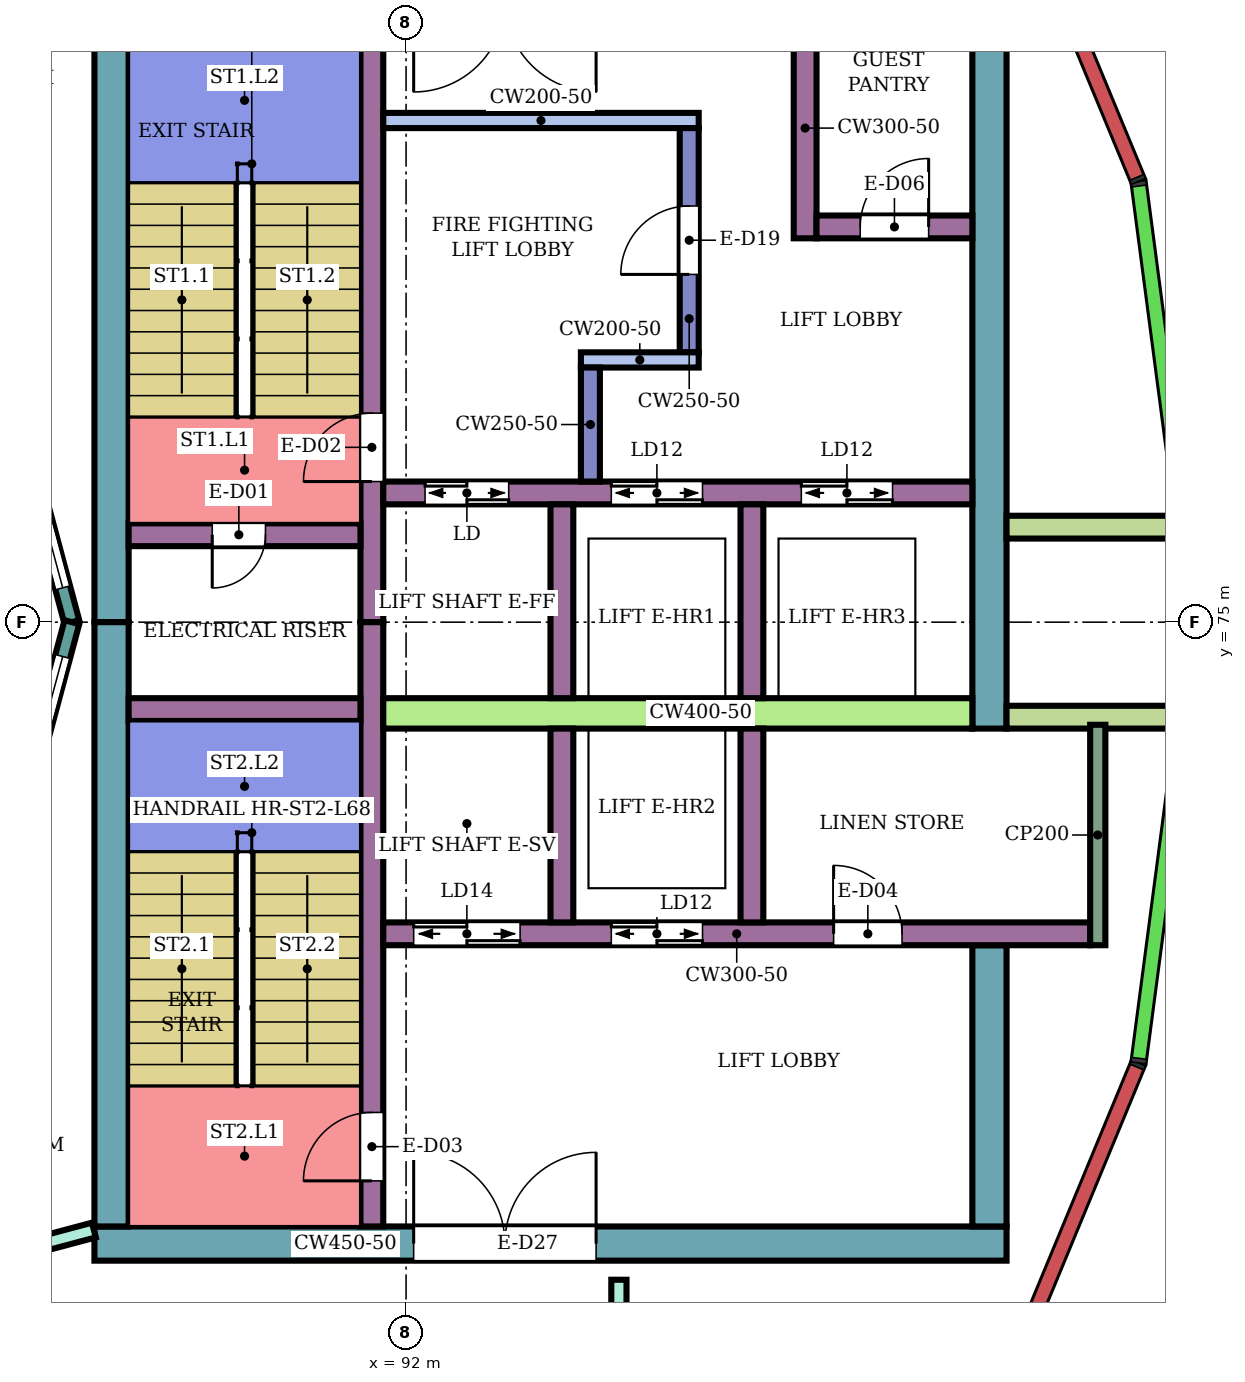
"""IFC4 building model, lengths in metres.
Left out: names, types, materials, properties, quantities, classifications, styles, units other than length and angle.
Written with IfcOpenShell. Run it as: python <this file> out.ifc"""

import sys

from ifc_helpers import new_model, si_unit, direction, frame, frame_2d, origin, place, context, subcontext, project, spatial, rectangle, extrude, element, fill, save


model = new_model("IFC4")
c1 = context("Model", 3, precision=1e-05, world=origin(), true_north=direction((0.0, 1.0)))
c2 = subcontext(c1, "Body", "Model", "MODEL_VIEW")
j1 = project(units=[si_unit("LENGTHUNIT", "METRE"), si_unit("PLANEANGLEUNIT", "RADIAN")], contexts=[c1])
p1 = place(None, origin())
s1 = spatial("IfcSite", under=j1, at=p1, CompositionType="ELEMENT")
p2 = place(p1, origin())
s2 = spatial("IfcBuilding", under=s1, at=p2, CompositionType="ELEMENT")
p3 = place(p2, frame((0.0, 0.0, 296.7)))
s3 = spatial("IfcBuildingStorey", under=s2, at=p3, CompositionType="ELEMENT", Elevation=296.7)
p4 = place(p3, frame((87.9, 66.825, 0.0), z_axis=(0.0, 0.0, 1.0), x_axis=(1.0, 0.0, 0.0)))
e1 = element("IfcWall", 1, at=p4, inside=s3, PredefinedType="SHEAR", context=c2, shape_type="SweptSolid", body=[
    extrude(rectangle(XDim=12.0, YDim=0.45, at=frame_2d((6.0, 0.0))), origin(), (0.0, 0.0, 1.0), 3.88),
])
p5 = place(p4, frame((4.2, 0.0, 0.0)))
e2 = element("IfcOpeningElement", 2, at=p5, cuts=e1, PredefinedType="OPENING", context=c2, shape_type="SweptSolid", body=[
    extrude(rectangle(XDim=2.4, YDim=2.4, at=frame_2d((1.2, 1.2))), frame((0.0, 0.235, 0.0), z_axis=(0.0, -1.0, 0.0), x_axis=(1.0, 0.0, 0.0)), (0.0, 0.0, 1.0), 0.47),
])
for number, where, z_axis, x_axis in (
    (3, (88.125, 75.0, 0.0), (0.0, 0.0, 1.0), (0.0, 1.0, 0.0)),
    (4, (88.125, 67.05, 0.0), (0.0, 0.0, 1.0), (0.0, 1.0, 0.0)),
):
    element("IfcWall", number, at=place(p3, frame(where, z_axis=z_axis, x_axis=x_axis)), inside=s3, PredefinedType="SHEAR", context=c2, shape_type="SweptSolid", body=[
        extrude(rectangle(XDim=7.95, YDim=0.45, at=frame_2d((3.975, 0.0))), origin(), (0.0, 0.0, 1.0), 3.88),
    ])
p6 = place(p3, frame((99.675, 73.6, 0.0), z_axis=(0.0, 0.0, 1.0), x_axis=(0.0, 1.0, 0.0)))
e5 = element("IfcWall", 5, at=p6, inside=s3, PredefinedType="SHEAR", context=c2, shape_type="SweptSolid", body=[
    extrude(rectangle(XDim=9.35, YDim=0.45, at=frame_2d((4.675, 0.0))), origin(), (0.0, 0.0, 1.0), 3.88),
])
p7 = place(p3, frame((99.675, 67.05, 0.0), z_axis=(0.0, 0.0, 1.0), x_axis=(0.0, 1.0, 0.0)))
e6 = element("IfcWall", 6, at=p7, inside=s3, PredefinedType="SHEAR", context=c2, shape_type="SweptSolid", body=[
    extrude(rectangle(XDim=3.7, YDim=0.45, at=frame_2d((1.85, 0.0))), origin(), (0.0, 0.0, 1.0), 3.88),
])
p8 = place(p3, frame((91.55, 75.0, 0.0), z_axis=(0.0, 0.0, 1.0), x_axis=(0.0, 1.0, 0.0)))
e7 = element("IfcWall", 7, at=p8, inside=s3, PredefinedType="SHEAR", context=c2, shape_type="SweptSolid", body=[
    extrude(rectangle(XDim=7.95, YDim=0.3, at=frame_2d((3.975, 0.0))), origin(), (0.0, 0.0, 1.0), 3.88),
])
p9 = place(p8, frame((1.85, 0.0, 0.0)))
e8 = element("IfcOpeningElement", 8, at=p9, cuts=e7, PredefinedType="OPENING", context=c2, shape_type="SweptSolid", body=[
    extrude(rectangle(XDim=0.9, YDim=2.1, at=frame_2d((0.45, 1.05))), frame((0.0, 0.16, 0.0), z_axis=(0.0, -1.0, 0.0), x_axis=(1.0, 0.0, 0.0)), (0.0, 0.0, 1.0), 0.32),
])
p10 = place(p3, frame((91.55, 67.05, 0.0), z_axis=(0.0, 0.0, 1.0), x_axis=(0.0, 1.0, 0.0)))
e9 = element("IfcWall", 9, at=p10, inside=s3, PredefinedType="SHEAR", context=c2, shape_type="SweptSolid", body=[
    extrude(rectangle(XDim=7.95, YDim=0.3, at=frame_2d((3.975, 0.0))), origin(), (0.0, 0.0, 1.0), 3.88),
])
p11 = place(p10, frame((0.6, 0.0, 0.0)))
e10 = element("IfcOpeningElement", 10, at=p11, cuts=e9, PredefinedType="OPENING", context=c2, shape_type="SweptSolid", body=[
    extrude(rectangle(XDim=0.9, YDim=2.1, at=frame_2d((0.45, 1.05))), frame((0.0, 0.16, 0.0), z_axis=(0.0, -1.0, 0.0), x_axis=(1.0, 0.0, 0.0)), (0.0, 0.0, 1.0), 0.32),
])
p12 = place(p3, frame((88.35, 76.15, 0.0), z_axis=(0.0, 0.0, 1.0), x_axis=(1.0, 0.0, 0.0)))
e11 = element("IfcWall", 11, at=p12, inside=s3, PredefinedType="SHEAR", context=c2, shape_type="SweptSolid", body=[
    extrude(rectangle(XDim=3.05, YDim=0.3, at=frame_2d((1.525, 0.0))), origin(), (0.0, 0.0, 1.0), 3.88),
])
p13 = place(p12, frame((1.1, 0.0, 0.0)))
e12 = element("IfcOpeningElement", 12, at=p13, cuts=e11, PredefinedType="OPENING", context=c2, shape_type="SweptSolid", body=[
    extrude(rectangle(XDim=0.7, YDim=2.0, at=frame_2d((0.35, 1.0))), frame((0.0, 0.16, 0.0), z_axis=(0.0, -1.0, 0.0), x_axis=(1.0, 0.0, 0.0)), (0.0, 0.0, 1.0), 0.32),
])
p14 = place(p3, frame((88.35, 73.85, 0.0), z_axis=(0.0, 0.0, 1.0), x_axis=(1.0, 0.0, 0.0)))
e13 = element("IfcWall", 13, at=p14, inside=s3, PredefinedType="SHEAR", context=c2, shape_type="SweptSolid", body=[
    extrude(rectangle(XDim=3.05, YDim=0.3, at=frame_2d((1.525, 0.0))), origin(), (0.0, 0.0, 1.0), 3.88),
])
p15 = place(p3, frame((91.7, 76.7, 0.0), z_axis=(0.0, 0.0, 1.0), x_axis=(1.0, 0.0, 0.0)))
e14 = element("IfcWall", 14, at=p15, inside=s3, PredefinedType="SHEAR", context=c2, shape_type="SweptSolid", body=[
    extrude(rectangle(XDim=7.75, YDim=0.3, at=frame_2d((3.875, 0.0))), origin(), (0.0, 0.0, 1.0), 3.88),
])
p16 = place(p15, frame((0.55, 0.0, 0.0)))
e15 = element("IfcOpeningElement", 15, at=p16, cuts=e14, PredefinedType="OPENING", context=c2, shape_type="SweptSolid", body=[
    extrude(rectangle(XDim=1.1, YDim=2.1, at=frame_2d((0.55, 1.05))), frame((0.0, 0.16, 0.0), z_axis=(0.0, -1.0, 0.0), x_axis=(1.0, 0.0, 0.0)), (0.0, 0.0, 1.0), 0.32),
])
p17 = place(p15, frame((3.0, 0.0, 0.0)))
e16 = element("IfcOpeningElement", 16, at=p17, cuts=e14, PredefinedType="OPENING", context=c2, shape_type="SweptSolid", body=[
    extrude(rectangle(XDim=1.2, YDim=2.1, at=frame_2d((0.6, 1.05))), frame((0.0, 0.16, 0.0), z_axis=(0.0, -1.0, 0.0), x_axis=(1.0, 0.0, 0.0)), (0.0, 0.0, 1.0), 0.32),
])
p18 = place(p15, frame((5.5, 0.0, 0.0)))
e17 = element("IfcOpeningElement", 17, at=p18, cuts=e14, PredefinedType="OPENING", context=c2, shape_type="SweptSolid", body=[
    extrude(rectangle(XDim=1.2, YDim=2.1, at=frame_2d((0.6, 1.05))), frame((0.0, 0.16, 0.0), z_axis=(0.0, -1.0, 0.0), x_axis=(1.0, 0.0, 0.0)), (0.0, 0.0, 1.0), 0.32),
])
p19 = place(p3, frame((91.7, 73.8, 0.0), z_axis=(0.0, 0.0, 1.0), x_axis=(1.0, 0.0, 0.0)))
e18 = element("IfcWall", 18, at=p19, inside=s3, PredefinedType="SHEAR", context=c2, shape_type="SweptSolid", body=[
    extrude(rectangle(XDim=7.75, YDim=0.4, at=frame_2d((3.875, 0.0))), origin(), (0.0, 0.0, 1.0), 3.88),
])
p20 = place(p3, frame((91.7, 70.9, 0.0), z_axis=(0.0, 0.0, 1.0), x_axis=(1.0, 0.0, 0.0)))
e19 = element("IfcWall", 19, at=p20, inside=s3, PredefinedType="SHEAR", context=c2, shape_type="SweptSolid", body=[
    extrude(rectangle(XDim=9.3, YDim=0.3, at=frame_2d((4.65, 0.0))), origin(), (0.0, 0.0, 1.0), 3.88),
])
p21 = place(p20, frame((0.4, 0.0, 0.0)))
e20 = element("IfcOpeningElement", 20, at=p21, cuts=e19, PredefinedType="OPENING", context=c2, shape_type="SweptSolid", body=[
    extrude(rectangle(XDim=1.4, YDim=2.1, at=frame_2d((0.7, 1.05))), frame((0.0, 0.16, 0.0), z_axis=(0.0, -1.0, 0.0), x_axis=(1.0, 0.0, 0.0)), (0.0, 0.0, 1.0), 0.32),
])
p22 = place(p20, frame((3.0, 0.0, 0.0)))
e21 = element("IfcOpeningElement", 21, at=p22, cuts=e19, PredefinedType="OPENING", context=c2, shape_type="SweptSolid", body=[
    extrude(rectangle(XDim=1.2, YDim=2.1, at=frame_2d((0.6, 1.05))), frame((0.0, 0.16, 0.0), z_axis=(0.0, -1.0, 0.0), x_axis=(1.0, 0.0, 0.0)), (0.0, 0.0, 1.0), 0.32),
])
p23 = place(p20, frame((5.925, 0.0, 0.0)))
e22 = element("IfcOpeningElement", 22, at=p23, cuts=e19, PredefinedType="OPENING", context=c2, shape_type="SweptSolid", body=[
    extrude(rectangle(XDim=0.9, YDim=2.1, at=frame_2d((0.45, 1.05))), frame((0.0, 0.16, 0.0), z_axis=(0.0, -1.0, 0.0), x_axis=(1.0, 0.0, 0.0)), (0.0, 0.0, 1.0), 0.32),
])
for number, where, z_axis, x_axis in (
    (23, (94.05, 74.0, 0.0), (0.0, 0.0, 1.0), (0.0, 1.0, 0.0)),
    (24, (96.55, 74.0, 0.0), (0.0, 0.0, 1.0), (0.0, 1.0, 0.0)),
    (25, (94.05, 71.05, 0.0), (0.0, 0.0, 1.0), (0.0, 1.0, 0.0)),
    (26, (96.55, 71.05, 0.0), (0.0, 0.0, 1.0), (0.0, 1.0, 0.0)),
):
    element("IfcWall", number, at=place(p3, frame(where, z_axis=z_axis, x_axis=x_axis)), inside=s3, PredefinedType="SHEAR", context=c2, shape_type="SweptSolid", body=[
        extrude(rectangle(XDim=2.55, YDim=0.3, at=frame_2d((1.275, 0.0))), origin(), (0.0, 0.0, 1.0), 3.88),
    ])
p24 = place(p3, frame((91.7, 81.6, 0.0), z_axis=(0.0, 0.0, 1.0), x_axis=(1.0, 0.0, 0.0)))
e27 = element("IfcWall", 27, at=p24, inside=s3, PredefinedType="SHEAR", context=c2, shape_type="SweptSolid", body=[
    extrude(rectangle(XDim=4.15, YDim=0.2, at=frame_2d((2.075, 0.0))), origin(), (0.0, 0.0, 1.0), 3.88),
])
p25 = place(p3, frame((95.725, 78.55, 0.0), z_axis=(0.0, 0.0, 1.0), x_axis=(0.0, 1.0, 0.0)))
e28 = element("IfcWall", 28, at=p25, inside=s3, PredefinedType="SHEAR", context=c2, shape_type="SweptSolid", body=[
    extrude(rectangle(XDim=2.95, YDim=0.25, at=frame_2d((1.475, 0.0))), origin(), (0.0, 0.0, 1.0), 3.88),
])
p26 = place(p25, frame((1.025, 0.0, 0.0)))
e29 = element("IfcOpeningElement", 29, at=p26, cuts=e28, PredefinedType="OPENING", context=c2, shape_type="SweptSolid", body=[
    extrude(rectangle(XDim=0.9, YDim=2.1, at=frame_2d((0.45, 1.05))), frame((0.0, 0.135, 0.0), z_axis=(0.0, -1.0, 0.0), x_axis=(1.0, 0.0, 0.0)), (0.0, 0.0, 1.0), 0.27),
])
p27 = place(p3, frame((94.3, 78.45, 0.0), z_axis=(0.0, 0.0, 1.0), x_axis=(1.0, 0.0, 0.0)))
e30 = element("IfcWall", 30, at=p27, inside=s3, PredefinedType="SHEAR", context=c2, shape_type="SweptSolid", body=[
    extrude(rectangle(XDim=1.55, YDim=0.2, at=frame_2d((0.775, 0.0))), origin(), (0.0, 0.0, 1.0), 3.88),
])
p28 = place(p3, frame((94.425, 76.85, 0.0), z_axis=(0.0, 0.0, 1.0), x_axis=(0.0, 1.0, 0.0)))
e31 = element("IfcWall", 31, at=p28, inside=s3, PredefinedType="SHEAR", context=c2, shape_type="SweptSolid", body=[
    extrude(rectangle(XDim=1.5, YDim=0.25, at=frame_2d((0.75, 0.0))), origin(), (0.0, 0.0, 1.0), 3.88),
])
p29 = place(p3, frame((97.25, 80.05, 0.0), z_axis=(0.0, 0.0, 1.0), x_axis=(0.0, 1.0, 0.0)))
e32 = element("IfcWall", 32, at=p29, inside=s3, PredefinedType="SHEAR", context=c2, shape_type="SweptSolid", body=[
    extrude(rectangle(XDim=2.9, YDim=0.3, at=frame_2d((1.45, 0.0))), origin(), (0.0, 0.0, 1.0), 3.88),
])
p30 = place(p3, frame((97.4, 80.2, 0.0), z_axis=(0.0, 0.0, 1.0), x_axis=(1.0, 0.0, 0.0)))
e33 = element("IfcWall", 33, at=p30, inside=s3, PredefinedType="SHEAR", context=c2, shape_type="SweptSolid", body=[
    extrude(rectangle(XDim=2.05, YDim=0.3, at=frame_2d((1.025, 0.0))), origin(), (0.0, 0.0, 1.0), 3.88),
])
p31 = place(p30, frame((0.575, 0.0, 0.0)))
e34 = element("IfcOpeningElement", 34, at=p31, cuts=e33, PredefinedType="OPENING", context=c2, shape_type="SweptSolid", body=[
    extrude(rectangle(XDim=0.9, YDim=2.1, at=frame_2d((0.45, 1.05))), frame((0.0, 0.16, 0.0), z_axis=(0.0, -1.0, 0.0), x_axis=(1.0, 0.0, 0.0)), (0.0, 0.0, 1.0), 0.32),
])
for number, where, z_axis, x_axis in (
    (35, (99.9, 73.75, 0.0), (0.0, 0.0, 1.0), (1.0, 0.0, 0.0)),
    (36, (99.9, 76.25, 0.0), (0.0, 0.0, 1.0), (1.0, 0.0, 0.0)),
):
    element("IfcWall", number, at=place(p3, frame(where, z_axis=z_axis, x_axis=x_axis)), inside=s3, PredefinedType="NOTDEFINED", context=c2, shape_type="SweptSolid", body=[
        extrude(rectangle(XDim=2.416, YDim=0.3, at=frame_2d((1.208, 0.0))), origin(), (0.0, 0.0, 1.0), 4.2),
    ])
p32 = place(p3, frame((87.604, 75.0, 0.0), z_axis=(0.0, 0.0, 1.0), x_axis=(-0.258789828301, 0.965933654434, 0.0)))
e37 = element("IfcWall", 37, at=p32, inside=s3, PredefinedType="NOTDEFINED", context=c2, shape_type="SweptSolid", body=[
    extrude(rectangle(XDim=3.936, YDim=0.2, at=frame_2d((1.968, 0.0))), origin(), (0.0, 0.0, 1.0), 4.2),
])
p33 = place(p32, frame((0.468, 0.0, 0.9)))
e38 = element("IfcOpeningElement", 38, at=p33, cuts=e37, PredefinedType="OPENING", context=c2, shape_type="SweptSolid", body=[
    extrude(rectangle(XDim=3.0, YDim=2.3, at=frame_2d((1.5, 1.15))), frame((0.0, 0.11, 0.0), z_axis=(0.0, -1.0, 0.0), x_axis=(1.0, 0.0, 0.0)), (0.0, 0.0, 1.0), 0.22),
])
p34 = place(p3, frame((86.585, 71.198, 0.0), z_axis=(0.0, 0.0, 1.0), x_axis=(0.258789828301, 0.965933654434, 0.0)))
e39 = element("IfcWall", 39, at=p34, inside=s3, PredefinedType="NOTDEFINED", context=c2, shape_type="SweptSolid", body=[
    extrude(rectangle(XDim=3.936, YDim=0.2, at=frame_2d((1.968, 0.0))), origin(), (0.0, 0.0, 1.0), 4.2),
])
p35 = place(p34, frame((0.468, 0.0, 0.9)))
e40 = element("IfcOpeningElement", 40, at=p35, cuts=e39, PredefinedType="OPENING", context=c2, shape_type="SweptSolid", body=[
    extrude(rectangle(XDim=3.0, YDim=2.3, at=frame_2d((1.5, 1.15))), frame((0.0, 0.11, 0.0), z_axis=(0.0, -1.0, 0.0), x_axis=(1.0, 0.0, 0.0)), (0.0, 0.0, 1.0), 0.22),
])
p36 = place(p3, frame((80.125, 64.932, 0.0), z_axis=(0.0, 0.0, 1.0), x_axis=(0.966236955806, 0.257655089674, 0.0)))
e41 = element("IfcWall", 41, at=p36, inside=s3, PredefinedType="PARTITIONING", context=c2, shape_type="SweptSolid", body=[
    extrude(rectangle(XDim=8.039, YDim=0.2, at=frame_2d((4.02, 0.0))), origin(), (0.0, 0.0, 1.0), 3.75),
])
p37 = place(p36, frame((6.298, 0.0, 0.0)))
e42 = element("IfcOpeningElement", 42, at=p37, cuts=e41, PredefinedType="OPENING", context=c2, shape_type="SweptSolid", body=[
    extrude(rectangle(XDim=0.9, YDim=2.1, at=frame_2d((0.45, 1.05))), frame((0.0, 0.11, 0.0), z_axis=(0.0, -1.0, 0.0), x_axis=(1.0, 0.0, 0.0)), (0.0, 0.0, 1.0), 0.22),
])
p38 = place(p36, frame((2.045, 0.0, 0.0)))
e43 = element("IfcOpeningElement", 43, at=p38, cuts=e41, PredefinedType="OPENING", context=c2, shape_type="SweptSolid", body=[
    extrude(rectangle(XDim=0.9, YDim=2.1, at=frame_2d((0.45, 1.05))), frame((0.0, 0.11, 0.0), z_axis=(0.0, -1.0, 0.0), x_axis=(1.0, 0.0, 0.0)), (0.0, 0.0, 1.0), 0.22),
])
p39 = place(p3, frame((94.8, 65.1, 0.0), z_axis=(0.0, 0.0, 1.0), x_axis=(0.0, 1.0, 0.0)))
e44 = element("IfcWall", 44, at=p39, inside=s3, PredefinedType="PARTITIONING", context=c2, shape_type="SweptSolid", body=[
    extrude(rectangle(XDim=1.249, YDim=0.2, at=frame_2d((0.625, 0.0))), origin(), (0.0, 0.0, 1.0), 3.75),
])
p40 = place(p3, frame((101.1, 70.75, 0.0), z_axis=(0.0, 0.0, 1.0), x_axis=(0.0, 1.0, 0.0)))
e45 = element("IfcWall", 45, at=p40, inside=s3, PredefinedType="PARTITIONING", context=c2, shape_type="SweptSolid", body=[
    extrude(rectangle(XDim=2.9, YDim=0.2, at=frame_2d((1.45, 0.0))), origin(), (0.0, 0.0, 1.0), 3.88),
])
p41 = place(p33, origin())
e46 = element("IfcWindow", 46, at=p41, inside=s3, PartitioningType="SINGLE_PANEL", PredefinedType="WINDOW", context=c2, shape_type="SweptSolid", body=[
    extrude(rectangle(XDim=3.0, YDim=2.3, at=frame_2d((1.5, 1.15))), frame((0.0, 0.03, 0.0), z_axis=(0.0, -1.0, 0.0), x_axis=(1.0, 0.0, 0.0)), (0.0, 0.0, 1.0), 0.06),
])
fill(e38, e46)
p42 = place(p35, origin())
e47 = element("IfcWindow", 47, at=p42, inside=s3, PartitioningType="SINGLE_PANEL", PredefinedType="WINDOW", context=c2, shape_type="SweptSolid", body=[
    extrude(rectangle(XDim=3.0, YDim=2.3, at=frame_2d((1.5, 1.15))), frame((0.0, 0.03, 0.0), z_axis=(0.0, -1.0, 0.0), x_axis=(1.0, 0.0, 0.0)), (0.0, 0.0, 1.0), 0.06),
])
fill(e40, e47)
p43 = place(p13, frame((0.7, 0.0, 0.0), z_axis=(0.0, 0.0, 1.0), x_axis=(-1.0, 0.0, 0.0)))
e48 = element("IfcDoor", 48, at=p43, inside=s3, OperationType="SINGLE_SWING_RIGHT", PredefinedType="DOOR", context=c2, shape_type="SweptSolid", body=[
    extrude(rectangle(XDim=0.7, YDim=2.0, at=frame_2d((0.35, 1.0))), frame((0.0, 0.025, 0.0), z_axis=(0.0, -1.0, 0.0), x_axis=(1.0, 0.0, 0.0)), (0.0, 0.0, 1.0), 0.05),
])
fill(e12, e48)
p44 = place(p9, origin())
e49 = element("IfcDoor", 49, at=p44, inside=s3, OperationType="SINGLE_SWING_LEFT", PredefinedType="DOOR", context=c2, shape_type="SweptSolid", body=[
    extrude(rectangle(XDim=0.9, YDim=2.1, at=frame_2d((0.45, 1.05))), frame((0.0, 0.025, 0.0), z_axis=(0.0, -1.0, 0.0), x_axis=(1.0, 0.0, 0.0)), (0.0, 0.0, 1.0), 0.05),
])
fill(e8, e49)
p45 = place(p11, origin())
e50 = element("IfcDoor", 50, at=p45, inside=s3, OperationType="SINGLE_SWING_LEFT", PredefinedType="DOOR", context=c2, shape_type="SweptSolid", body=[
    extrude(rectangle(XDim=0.9, YDim=2.1, at=frame_2d((0.45, 1.05))), frame((0.0, 0.025, 0.0), z_axis=(0.0, -1.0, 0.0), x_axis=(1.0, 0.0, 0.0)), (0.0, 0.0, 1.0), 0.05),
])
fill(e10, e50)
p46 = place(p16, origin())
e51 = element("IfcDoor", 51, at=p46, inside=s3, OperationType="DOUBLE_DOOR_SLIDING", PredefinedType="DOOR", context=c2, shape_type="SweptSolid", body=[
    extrude(rectangle(XDim=1.1, YDim=2.1, at=frame_2d((0.55, 1.05))), frame((0.0, 0.025, 0.0), z_axis=(0.0, -1.0, 0.0), x_axis=(1.0, 0.0, 0.0)), (0.0, 0.0, 1.0), 0.05),
])
fill(e15, e51)
p47 = place(p17, origin())
e52 = element("IfcDoor", 52, at=p47, inside=s3, OperationType="DOUBLE_DOOR_SLIDING", PredefinedType="DOOR", context=c2, shape_type="SweptSolid", body=[
    extrude(rectangle(XDim=1.2, YDim=2.1, at=frame_2d((0.6, 1.05))), frame((0.0, 0.025, 0.0), z_axis=(0.0, -1.0, 0.0), x_axis=(1.0, 0.0, 0.0)), (0.0, 0.0, 1.0), 0.05),
])
fill(e16, e52)
p48 = place(p18, origin())
e53 = element("IfcDoor", 53, at=p48, inside=s3, OperationType="DOUBLE_DOOR_SLIDING", PredefinedType="DOOR", context=c2, shape_type="SweptSolid", body=[
    extrude(rectangle(XDim=1.2, YDim=2.1, at=frame_2d((0.6, 1.05))), frame((0.0, 0.025, 0.0), z_axis=(0.0, -1.0, 0.0), x_axis=(1.0, 0.0, 0.0)), (0.0, 0.0, 1.0), 0.05),
])
fill(e17, e53)
p49 = place(p21, origin())
e54 = element("IfcDoor", 54, at=p49, inside=s3, OperationType="DOUBLE_DOOR_SLIDING", PredefinedType="DOOR", context=c2, shape_type="SweptSolid", body=[
    extrude(rectangle(XDim=1.4, YDim=2.1, at=frame_2d((0.7, 1.05))), frame((0.0, 0.025, 0.0), z_axis=(0.0, -1.0, 0.0), x_axis=(1.0, 0.0, 0.0)), (0.0, 0.0, 1.0), 0.05),
])
fill(e20, e54)
p50 = place(p22, origin())
e55 = element("IfcDoor", 55, at=p50, inside=s3, OperationType="DOUBLE_DOOR_SLIDING", PredefinedType="DOOR", context=c2, shape_type="SweptSolid", body=[
    extrude(rectangle(XDim=1.2, YDim=2.1, at=frame_2d((0.6, 1.05))), frame((0.0, 0.025, 0.0), z_axis=(0.0, -1.0, 0.0), x_axis=(1.0, 0.0, 0.0)), (0.0, 0.0, 1.0), 0.05),
])
fill(e21, e55)
p51 = place(p23, origin())
e56 = element("IfcDoor", 56, at=p51, inside=s3, OperationType="SINGLE_SWING_LEFT", PredefinedType="DOOR", context=c2, shape_type="SweptSolid", body=[
    extrude(rectangle(XDim=0.9, YDim=2.1, at=frame_2d((0.45, 1.05))), frame((0.0, 0.025, 0.0), z_axis=(0.0, -1.0, 0.0), x_axis=(1.0, 0.0, 0.0)), (0.0, 0.0, 1.0), 0.05),
])
fill(e22, e56)
p52 = place(p26, origin())
e57 = element("IfcDoor", 57, at=p52, inside=s3, OperationType="SINGLE_SWING_LEFT", PredefinedType="DOOR", context=c2, shape_type="SweptSolid", body=[
    extrude(rectangle(XDim=0.9, YDim=2.1, at=frame_2d((0.45, 1.05))), frame((0.0, 0.025, 0.0), z_axis=(0.0, -1.0, 0.0), x_axis=(1.0, 0.0, 0.0)), (0.0, 0.0, 1.0), 0.05),
])
fill(e29, e57)
p53 = place(p31, origin())
e58 = element("IfcDoor", 58, at=p53, inside=s3, OperationType="SINGLE_SWING_RIGHT", PredefinedType="DOOR", context=c2, shape_type="SweptSolid", body=[
    extrude(rectangle(XDim=0.9, YDim=2.1, at=frame_2d((0.45, 1.05))), frame((0.0, 0.025, 0.0), z_axis=(0.0, -1.0, 0.0), x_axis=(1.0, 0.0, 0.0)), (0.0, 0.0, 1.0), 0.05),
])
fill(e34, e58)
p54 = place(p5, origin())
e59 = element("IfcDoor", 59, at=p54, inside=s3, OperationType="DOUBLE_DOOR_SINGLE_SWING", PredefinedType="DOOR", context=c2, shape_type="SweptSolid", body=[
    extrude(rectangle(XDim=2.4, YDim=2.4, at=frame_2d((1.2, 1.2))), frame((0.0, 0.025, 0.0), z_axis=(0.0, -1.0, 0.0), x_axis=(1.0, 0.0, 0.0)), (0.0, 0.0, 1.0), 0.05),
])
fill(e2, e59)
save(model, sys.argv[1])
